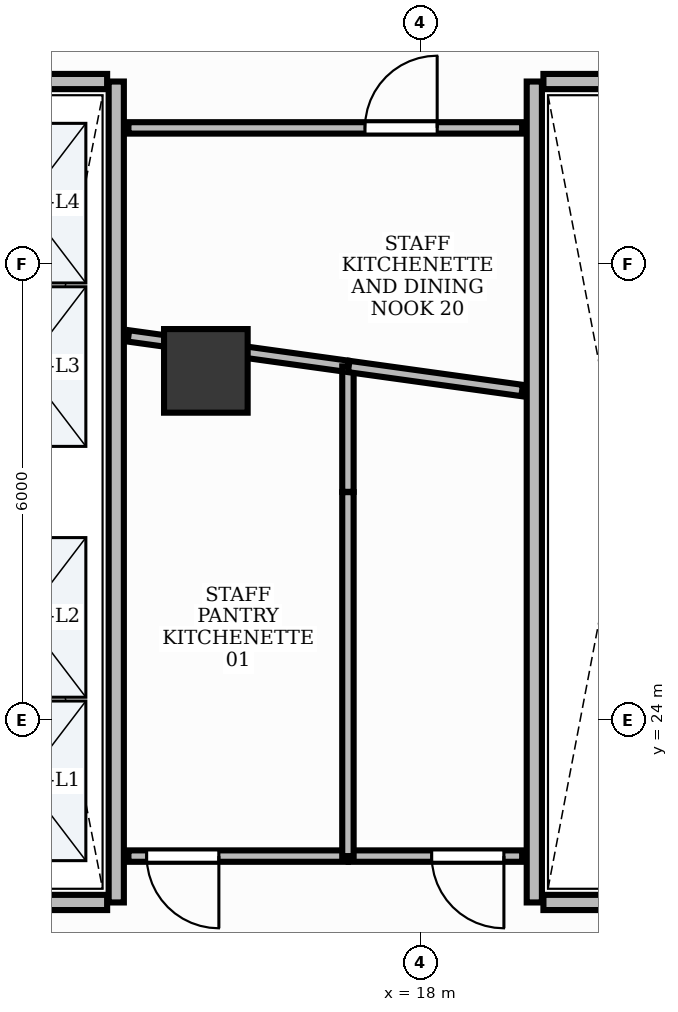
"""IFC4 building model, lengths in metres.
Left out: names, types, materials, properties, quantities, classifications, styles, units other than length and angle.
Written with IfcOpenShell. Run it as: python <this file> out.ifc"""

import sys

from ifc_helpers import new_model, si_unit, direction, frame, frame_2d, origin, origin_2d, place, context, subcontext, project, spatial, rectangle, extrude, element, fill, save


model = new_model("IFC4")
c1 = context("Model", 3, precision=1e-05, world=origin(), true_north=direction((0.0, 1.0)))
c2 = subcontext(c1, "Body", "Model", "MODEL_VIEW")
j1 = project(units=[si_unit("LENGTHUNIT", "METRE"), si_unit("PLANEANGLEUNIT", "RADIAN")], contexts=[c1])
p1 = place(None, origin())
s1 = spatial("IfcSite", under=j1, at=p1, CompositionType="ELEMENT")
p2 = place(p1, origin())
s2 = spatial("IfcBuilding", under=s1, at=p2, CompositionType="ELEMENT")
p3 = place(p2, frame((0.0, 0.0, 55.2)))
s3 = spatial("IfcBuildingStorey", under=s2, at=p3, CompositionType="ELEMENT", Elevation=55.2)
p4 = place(p3, frame((15.179, 28.594, -0.0), z_axis=(0.0, 0.0, 1.0), x_axis=(1.0, 0.0, 0.0)))
e1 = element("IfcColumn", 1, at=p4, inside=s3, PredefinedType="COLUMN", context=c2, shape_type="SweptSolid", body=[
    extrude(rectangle(XDim=1.1, YDim=1.1, at=origin_2d()), origin(), (0.0, 0.0, 1.0), 3.901),
])
p5 = place(p3, frame((14.0, 21.6, 0.0), z_axis=(0.0, 0.0, 1.0), x_axis=(0.0, 1.0, 0.0)))
e2 = element("IfcWall", 2, at=p5, inside=s3, PredefinedType="PARTITIONING", context=c2, shape_type="SweptSolid", body=[
    extrude(rectangle(XDim=10.8, YDim=0.2, at=frame_2d((5.4, 0.0))), origin(), (0.0, 0.0, 1.0), 2.91),
])
for number, where, z_axis, x_axis in (
    (3, (11.72, 21.6, 0.0), (0.0, 0.0, 1.0), (1.0, 0.0, 0.0)),
    (4, (11.72, 32.4, 0.0), (0.0, 0.0, 1.0), (1.0, 0.0, 0.0)),
):
    element("IfcWall", number, at=place(p3, frame(where, z_axis=z_axis, x_axis=x_axis)), inside=s3, PredefinedType="PARTITIONING", context=c2, shape_type="SweptSolid", body=[
        extrude(rectangle(XDim=2.16, YDim=0.2, at=frame_2d((1.08, 0.0))), origin(), (0.0, 0.0, 1.0), 2.91),
    ])
p6 = place(p3, frame((19.5, 21.6, 0.0), z_axis=(0.0, 0.0, 1.0), x_axis=(0.0, 1.0, 0.0)))
e5 = element("IfcWall", 5, at=p6, inside=s3, PredefinedType="PARTITIONING", context=c2, shape_type="SweptSolid", body=[
    extrude(rectangle(XDim=10.8, YDim=0.2, at=frame_2d((5.4, 0.0))), origin(), (0.0, 0.0, 1.0), 2.91),
])
for number, where, z_axis, x_axis in (
    (6, (19.62, 21.6, 0.0), (0.0, 0.0, 1.0), (1.0, 0.0, 0.0)),
    (7, (19.62, 32.4, 0.0), (0.0, 0.0, 1.0), (1.0, 0.0, 0.0)),
):
    element("IfcWall", number, at=place(p3, frame(where, z_axis=z_axis, x_axis=x_axis)), inside=s3, PredefinedType="PARTITIONING", context=c2, shape_type="SweptSolid", body=[
        extrude(rectangle(XDim=2.11, YDim=0.2, at=frame_2d((1.055, 0.0))), origin(), (0.0, 0.0, 1.0), 2.91),
    ])
p7 = place(p3, frame((17.048, 22.21, 0.0), z_axis=(0.0, 0.0, 1.0), x_axis=(-1.0, 0.0, 0.0)))
e8 = element("IfcWall", 8, at=p7, inside=s3, PredefinedType="PARTITIONING", context=c2, shape_type="SweptSolid", body=[
    extrude(rectangle(XDim=2.888, YDim=0.15, at=frame_2d((1.444, 0.0))), origin(), (0.0, 0.0, 1.0), 2.91),
])
p8 = place(p7, frame((1.698, 0.0, 0.0)))
e9 = element("IfcOpeningElement", 9, at=p8, cuts=e8, PredefinedType="OPENING", context=c2, shape_type="SweptSolid", body=[
    extrude(rectangle(XDim=0.95, YDim=2.15, at=frame_2d((0.475, 1.075))), frame((0.0, 0.09, 0.0), z_axis=(0.0, -1.0, 0.0), x_axis=(1.0, 0.0, 0.0)), (0.0, 0.0, 1.0), 0.18),
])
p9 = place(p3, frame((19.34, 22.21, 0.0), z_axis=(0.0, 0.0, 1.0), x_axis=(-1.0, 0.0, 0.0)))
e10 = element("IfcWall", 10, at=p9, inside=s3, PredefinedType="PARTITIONING", context=c2, shape_type="SweptSolid", body=[
    extrude(rectangle(XDim=2.282, YDim=0.15, at=frame_2d((1.141, 0.0))), origin(), (0.0, 0.0, 1.0), 2.91),
])
p10 = place(p9, frame((0.24, 0.0, 0.0)))
e11 = element("IfcOpeningElement", 11, at=p10, cuts=e10, PredefinedType="OPENING", context=c2, shape_type="SweptSolid", body=[
    extrude(rectangle(XDim=0.95, YDim=2.15, at=frame_2d((0.475, 1.075))), frame((0.0, 0.09, 0.0), z_axis=(0.0, -1.0, 0.0), x_axis=(1.0, 0.0, 0.0)), (0.0, 0.0, 1.0), 0.18),
])
p11 = place(p3, frame((14.16, 31.79, 0.0), z_axis=(0.0, 0.0, 1.0), x_axis=(1.0, 0.0, 0.0)))
e12 = element("IfcWall", 12, at=p11, inside=s3, PredefinedType="PARTITIONING", context=c2, shape_type="SweptSolid", body=[
    extrude(rectangle(XDim=5.18, YDim=0.15, at=frame_2d((2.59, 0.0))), origin(), (0.0, 0.0, 1.0), 2.91),
])
p12 = place(p11, frame((3.112, 0.0, 0.0)))
e13 = element("IfcOpeningElement", 13, at=p12, cuts=e12, PredefinedType="OPENING", context=c2, shape_type="SweptSolid", body=[
    extrude(rectangle(XDim=0.95, YDim=2.15, at=frame_2d((0.475, 1.075))), frame((0.0, 0.09, 0.0), z_axis=(0.0, -1.0, 0.0), x_axis=(1.0, 0.0, 0.0)), (0.0, 0.0, 1.0), 0.18),
])
p13 = place(p3, frame((14.16, 29.053, 0.0), z_axis=(0.0, 0.0, 1.0), x_axis=(0.990512548381, -0.137422310779, 0.0)))
e14 = element("IfcWall", 14, at=p13, inside=s3, PredefinedType="PARTITIONING", context=c2, shape_type="SweptSolid", body=[
    extrude(rectangle(XDim=2.915, YDim=0.15, at=frame_2d((1.458, 0.0))), origin(), (0.0, 0.0, 1.0), 2.91),
])
p14 = place(p3, frame((17.048, 28.653, 0.0), z_axis=(0.0, 0.0, 1.0), x_axis=(0.0, -1.0, 0.0)))
e15 = element("IfcWall", 15, at=p14, inside=s3, PredefinedType="PARTITIONING", context=c2, shape_type="SweptSolid", body=[
    extrude(rectangle(XDim=1.65, YDim=0.15, at=frame_2d((0.825, 0.0))), origin(), (0.0, 0.0, 1.0), 2.91),
])
p15 = place(p3, frame((17.048, 26.998, 0.0), z_axis=(0.0, 0.0, 1.0), x_axis=(0.0, -1.0, 0.0)))
e16 = element("IfcWall", 16, at=p15, inside=s3, PredefinedType="PARTITIONING", context=c2, shape_type="SweptSolid", body=[
    extrude(rectangle(XDim=4.788, YDim=0.15, at=frame_2d((2.394, 0.0))), origin(), (0.0, 0.0, 1.0), 2.91),
])
p16 = place(p3, frame((17.058, 28.651, 0.0), z_axis=(0.0, 0.0, 1.0), x_axis=(0.99050751053, -0.137458617714, 0.0)))
e17 = element("IfcWall", 17, at=p16, inside=s3, PredefinedType="PARTITIONING", context=c2, shape_type="SweptSolid", body=[
    extrude(rectangle(XDim=2.304, YDim=0.15, at=frame_2d((1.152, 0.0))), origin(), (0.0, 0.0, 1.0), 2.91),
])
p17 = place(p8, origin())
e18 = element("IfcDoor", 18, at=p17, inside=s3, OperationType="SINGLE_SWING_LEFT", PredefinedType="DOOR", context=c2, shape_type="SweptSolid", body=[
    extrude(rectangle(XDim=0.95, YDim=2.15, at=frame_2d((0.475, 1.075))), frame((0.0, 0.025, 0.0), z_axis=(0.0, -1.0, 0.0), x_axis=(1.0, 0.0, 0.0)), (0.0, 0.0, 1.0), 0.05),
])
fill(e9, e18)
p18 = place(p10, origin())
e19 = element("IfcDoor", 19, at=p18, inside=s3, OperationType="SINGLE_SWING_LEFT", PredefinedType="DOOR", context=c2, shape_type="SweptSolid", body=[
    extrude(rectangle(XDim=0.95, YDim=2.15, at=frame_2d((0.475, 1.075))), frame((0.0, 0.025, 0.0), z_axis=(0.0, -1.0, 0.0), x_axis=(1.0, 0.0, 0.0)), (0.0, 0.0, 1.0), 0.05),
])
fill(e11, e19)
p19 = place(p12, origin())
e20 = element("IfcDoor", 20, at=p19, inside=s3, OperationType="SINGLE_SWING_RIGHT", PredefinedType="DOOR", context=c2, shape_type="SweptSolid", body=[
    extrude(rectangle(XDim=0.95, YDim=2.15, at=frame_2d((0.475, 1.075))), frame((0.0, 0.025, 0.0), z_axis=(0.0, -1.0, 0.0), x_axis=(1.0, 0.0, 0.0)), (0.0, 0.0, 1.0), 0.05),
])
fill(e13, e20)
save(model, sys.argv[1])
